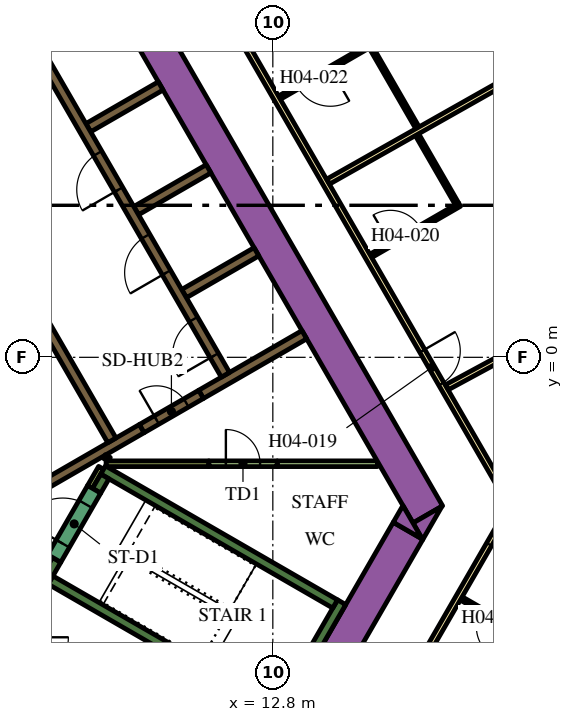
"""IFC4 building model, lengths in metres.
Left out: names, types, materials, properties, quantities, classifications, styles, units other than length and angle.
Written with IfcOpenShell. Run it as: python <this file> out.ifc"""

import sys

from ifc_helpers import new_model, si_unit, direction, frame, frame_2d, origin, place, context, subcontext, project, spatial, polyline, rectangle, outline, extrude, element, fill, save


model = new_model("IFC4")
c1 = context("Model", 3, precision=1e-05, world=origin(), true_north=direction((0.0, 1.0)))
c2 = subcontext(c1, "Body", "Model", "MODEL_VIEW")
j1 = project(units=[si_unit("LENGTHUNIT", "METRE"), si_unit("PLANEANGLEUNIT", "RADIAN")], contexts=[c1])
p1 = place(None, origin())
s1 = spatial("IfcSite", under=j1, at=p1, CompositionType="ELEMENT")
p2 = place(p1, origin())
s2 = spatial("IfcBuilding", under=s1, at=p2, CompositionType="ELEMENT")
p3 = place(p2, frame((0.0, 0.0, 62.7)))
s3 = spatial("IfcBuildingStorey", under=s2, at=p3, CompositionType="ELEMENT", Elevation=62.7)
p4 = place(p3, frame((6.776, 13.364, 0.0), z_axis=(0.0, 0.0, 1.0), x_axis=(0.500004177138, -0.8660229921, 0.0)))
e1 = element("IfcWall", 1, at=p4, inside=s3, PredefinedType="SOLIDWALL", context=c2, shape_type="SweptSolid", body=[
    extrude(rectangle(XDim=20.204, YDim=0.9, at=frame_2d((10.102, 0.0))), origin(), (0.0, 0.0, 1.0), 3.9),
])
p5 = place(p3, origin())
e2 = element("IfcWall", 2, at=p5, inside=s3, PredefinedType="SOLIDWALL", context=c2, shape_type="SweptSolid", body=[
    extrude(outline(polyline([(16.743, -4.8), (16.489, -4.36), (17.251, -3.92), (16.743, -4.8)])), origin(), (0.0, 0.0, 1.0), 3.9),
])
p6 = place(p3, frame((11.695, -12.644, 0.0), z_axis=(0.0, 0.0, 1.0), x_axis=(0.500010229568, 0.86601949766, 0.0)))
e3 = element("IfcWall", 3, at=p6, inside=s3, PredefinedType="SOLIDWALL", context=c2, shape_type="SweptSolid", body=[
    extrude(rectangle(XDim=9.326, YDim=0.9, at=frame_2d((4.663, 0.0))), origin(), (0.0, 0.0, 1.0), 3.9),
])
e4 = element("IfcWall", 4, at=p5, inside=s3, PredefinedType="SOLIDWALL", context=c2, shape_type="SweptSolid", body=[
    extrude(outline(polyline([(16.223, -3.9), (16.732, -4.78), (15.969, -4.34), (16.223, -3.9)])), origin(), (0.0, 0.0, 1.0), 3.9),
])
p7 = place(p3, frame((12.885, -9.431, 0.0), z_axis=(0.0, 0.0, 1.0), x_axis=(0.500020560727, 0.866013532718, 0.0)))
e5 = element("IfcWall", 5, at=p7, inside=s3, PredefinedType="SOLIDWALL", context=c2, shape_type="SweptSolid", body=[
    extrude(rectangle(XDim=3.45, YDim=0.25, at=frame_2d((1.725, 0.0))), origin(), (0.0, 0.0, 1.0), 3.9),
])
p8 = place(p3, frame((12.84, -9.261, 0.0), z_axis=(0.0, 0.0, 1.0), x_axis=(-0.866013990052, 0.500019768644, 0.0)))
e6 = element("IfcWall", 6, at=p8, inside=s3, PredefinedType="SOLIDWALL", context=c2, shape_type="SweptSolid", body=[
    extrude(rectangle(XDim=6.8, YDim=0.25, at=frame_2d((3.4, 0.0))), origin(), (0.0, 0.0, 1.0), 3.9),
])
p9 = place(p3, frame((7.113, -5.33, 0.0), z_axis=(0.0, 0.0, 1.0), x_axis=(-0.499965889992, -0.866045096311, 0.0)))
e7 = element("IfcWall", 7, at=p9, inside=s3, PredefinedType="SOLIDWALL", context=c2, shape_type="SweptSolid", body=[
    extrude(rectangle(XDim=0.666, YDim=0.25, at=frame_2d((0.333, 0.0))), origin(), (0.0, 0.0, 1.0), 3.9),
])
p10 = place(p3, frame((8.334, -2.964, 0.0), z_axis=(0.0, 0.0, 1.0), x_axis=(0.866016039709, -0.500016218704, 0.0)))
e8 = element("IfcWall", 8, at=p10, inside=s3, PredefinedType="SOLIDWALL", context=c2, shape_type="SweptSolid", body=[
    extrude(rectangle(XDim=7.05, YDim=0.25, at=frame_2d((3.525, 0.0))), origin(), (0.0, 0.0, 1.0), 3.9),
])
p11 = place(p3, frame((8.163, -3.511, 0.0), z_axis=(0.0, 0.0, 1.0), x_axis=(0.500127794843, 0.865951608824, 0.0)))
e9 = element("IfcWall", 9, at=p11, inside=s3, PredefinedType="SOLIDWALL", context=c2, shape_type="SweptSolid", body=[
    extrude(rectangle(XDim=0.435, YDim=0.25, at=frame_2d((0.217, 0.0))), origin(), (0.0, 0.0, 1.0), 3.9),
])
p12 = place(p3, frame((10.464, 1.677, 0.0), z_axis=(0.0, 0.0, 1.0), x_axis=(0.86605622881, 0.499946605688, 0.0)))
e10 = element("IfcWall", 10, at=p12, inside=s3, PredefinedType="SOLIDWALL", context=c2, shape_type="SweptSolid", body=[
    extrude(rectangle(XDim=2.2, YDim=0.25, at=frame_2d((1.1, 0.0))), origin(), (0.0, 0.0, 1.0), 3.9),
])
p13 = place(p3, frame((9.352, -1.875, 0.0), z_axis=(0.0, 0.0, 1.0), x_axis=(-0.866024844342, -0.500000968981, 0.0)))
e11 = element("IfcWall", 11, at=p13, inside=s3, PredefinedType="SOLIDWALL", context=c2, shape_type="SweptSolid", body=[
    extrude(rectangle(XDim=3.162, YDim=0.25, at=frame_2d((1.581, 0.0))), origin(), (0.0, 0.0, 1.0), 3.9),
])
for number, where, z_axis, x_axis in (
    (12, (7.944, 6.041, 0.0), (0.0, 0.0, 1.0), (0.866, 0.5, 0.0)),
    (13, (9.204, 3.859, 0.0), (0.0, 0.0, 1.0), (0.866, 0.5, 0.0)),
):
    element("IfcWall", number, at=place(p3, frame(where, z_axis=z_axis, x_axis=x_axis)), inside=s3, PredefinedType="SOLIDWALL", context=c2, shape_type="SweptSolid", body=[
        extrude(rectangle(XDim=2.2, YDim=0.25, at=frame_2d((1.1, 0.0))), origin(), (0.0, 0.0, 1.0), 3.9),
    ])
p14 = place(p3, frame((10.911, -0.975, 0.0), z_axis=(0.0, 0.0, 1.0), x_axis=(0.866046979468, 0.499962627957, 0.0)))
e14 = element("IfcWall", 14, at=p14, inside=s3, PredefinedType="SOLIDWALL", context=c2, shape_type="SweptSolid", body=[
    extrude(rectangle(XDim=3.138, YDim=0.25, at=frame_2d((1.569, 0.0))), origin(), (0.0, 0.0, 1.0), 3.9),
])
p15 = place(p3, frame((8.412, -2.8, 0.0), z_axis=(0.0, 0.0, 1.0), x_axis=(1.0, 0.0, 0.0)))
e15 = element("IfcWall", 15, at=p15, inside=s3, PredefinedType="PARTITIONING", context=c2, shape_type="SweptSolid", body=[
    extrude(rectangle(XDim=2.702, YDim=0.15, at=frame_2d((1.351, 0.0))), origin(), (0.0, 0.0, 1.0), 3.9),
])
p16 = place(p3, frame((8.459, -2.599, 0.0), z_axis=(0.0, 0.0, 1.0), x_axis=(-0.501919277433, -0.864914469148, 0.0)))
e16 = element("IfcWall", 16, at=p16, inside=s3, PredefinedType="PARTITIONING", context=c2, shape_type="SweptSolid", body=[
    extrude(rectangle(XDim=0.109, YDim=0.15, at=frame_2d((0.054, 0.0))), origin(), (0.0, 0.0, 1.0), 3.9),
])
p17 = place(p3, frame((8.281, -2.907, 0.0), z_axis=(0.0, 0.0, 1.0), x_axis=(-0.500193841991, -0.86591346013, 0.0)))
e17 = element("IfcWall", 17, at=p17, inside=s3, PredefinedType="PARTITIONING", context=c2, shape_type="SweptSolid", body=[
    extrude(rectangle(XDim=0.583, YDim=0.15, at=frame_2d((0.292, 0.0))), origin(), (0.0, 0.0, 1.0), 3.9),
])
p18 = place(p3, frame((12.915, -2.8, 0.0), z_axis=(0.0, 0.0, 1.0), x_axis=(1.0, 0.0, 0.0)))
e18 = element("IfcWall", 18, at=p18, inside=s3, PredefinedType="PARTITIONING", context=c2, shape_type="SweptSolid", body=[
    extrude(rectangle(XDim=2.637, YDim=0.15, at=frame_2d((1.318, 0.0))), origin(), (0.0, 0.0, 1.0), 2.75),
])
p19 = place(p3, frame((11.553, -0.46, 0.0), z_axis=(0.0, 0.0, 1.0), x_axis=(-0.500006514828, 0.866021642414, 0.0)))
e19 = element("IfcWall", 19, at=p19, inside=s3, PredefinedType="SOLIDWALL", context=c2, shape_type="SweptSolid", body=[
    extrude(rectangle(XDim=12.35, YDim=0.25, at=frame_2d((6.175, 0.0))), origin(), (0.0, 0.0, 1.0), 3.9),
])
p20 = place(p19, frame((0.585, 0.0, 0.0)))
e20 = element("IfcOpeningElement", 20, at=p20, cuts=e19, PredefinedType="OPENING", context=c2, shape_type="SweptSolid", body=[
    extrude(rectangle(XDim=1.1, YDim=2.1, at=frame_2d((0.55, 1.05))), frame((0.0, 0.135, 0.0), z_axis=(0.0, -1.0, 0.0), x_axis=(1.0, 0.0, 0.0)), (0.0, 0.0, 1.0), 0.27),
])
p21 = place(p19, frame((3.105, 0.0, 0.0)))
e21 = element("IfcOpeningElement", 21, at=p21, cuts=e19, PredefinedType="OPENING", context=c2, shape_type="SweptSolid", body=[
    extrude(rectangle(XDim=1.1, YDim=2.1, at=frame_2d((0.55, 1.05))), frame((0.0, 0.135, 0.0), z_axis=(0.0, -1.0, 0.0), x_axis=(1.0, 0.0, 0.0)), (0.0, 0.0, 1.0), 0.27),
])
p22 = place(p19, frame((5.625, 0.0, 0.0)))
e22 = element("IfcOpeningElement", 22, at=p22, cuts=e19, PredefinedType="OPENING", context=c2, shape_type="SweptSolid", body=[
    extrude(rectangle(XDim=1.1, YDim=2.1, at=frame_2d((0.55, 1.05))), frame((0.0, 0.135, 0.0), z_axis=(0.0, -1.0, 0.0), x_axis=(1.0, 0.0, 0.0)), (0.0, 0.0, 1.0), 0.27),
])
p23 = place(p3, frame((8.565, -2.185, 0.0), z_axis=(0.0, 0.0, 1.0), x_axis=(-0.499997954832, 0.866026584559, 0.0)))
e23 = element("IfcWall", 23, at=p23, inside=s3, PredefinedType="SOLIDWALL", context=c2, shape_type="SweptSolid", body=[
    extrude(rectangle(XDim=12.35, YDim=0.25, at=frame_2d((6.175, 0.0))), origin(), (0.0, 0.0, 1.0), 3.9),
])
p24 = place(p23, frame((5.725, 0.0, 0.0)))
e24 = element("IfcOpeningElement", 24, at=p24, cuts=e23, PredefinedType="OPENING", context=c2, shape_type="SweptSolid", body=[
    extrude(rectangle(XDim=0.9, YDim=2.1, at=frame_2d((0.45, 1.05))), frame((0.0, 0.135, 0.0), z_axis=(0.0, -1.0, 0.0), x_axis=(1.0, 0.0, 0.0)), (0.0, 0.0, 1.0), 0.27),
])
p25 = place(p3, frame((7.048, -5.292, 0.0), z_axis=(0.0, 0.0, 1.0), x_axis=(0.49994051562, 0.866059744384, 0.0)))
e25 = element("IfcWall", 25, at=p25, inside=s3, PredefinedType="SOLIDWALL", context=c2, shape_type="SweptSolid", body=[
    extrude(rectangle(XDim=2.1, YDim=0.4, at=frame_2d((1.05, 0.0))), origin(), (0.0, 0.0, 1.0), 3.9),
])
p26 = place(p25, frame((0.45, 0.0, 0.0)))
e26 = element("IfcOpeningElement", 26, at=p26, cuts=e25, PredefinedType="OPENING", context=c2, shape_type="SweptSolid", body=[
    extrude(rectangle(XDim=1.2, YDim=2.1, at=frame_2d((0.6, 1.05))), frame((0.0, 0.21, 0.0), z_axis=(0.0, -1.0, 0.0), x_axis=(1.0, 0.0, 0.0)), (0.0, 0.0, 1.0), 0.42),
])
p27 = place(p3, frame((9.352, -1.875, 0.0), z_axis=(0.0, 0.0, 1.0), x_axis=(0.865989075817, 0.500062916607, 0.0)))
e27 = element("IfcWall", 27, at=p27, inside=s3, PredefinedType="SOLIDWALL", context=c2, shape_type="SweptSolid", body=[
    extrude(rectangle(XDim=1.8, YDim=0.25, at=frame_2d((0.9, 0.0))), origin(), (0.0, 0.0, 1.0), 3.9),
])
p28 = place(p27, frame((0.45, 0.0, 0.0)))
e28 = element("IfcOpeningElement", 28, at=p28, cuts=e27, PredefinedType="OPENING", context=c2, shape_type="SweptSolid", body=[
    extrude(rectangle(XDim=0.9, YDim=2.1, at=frame_2d((0.45, 1.05))), frame((0.0, 0.135, 0.0), z_axis=(0.0, -1.0, 0.0), x_axis=(1.0, 0.0, 0.0)), (0.0, 0.0, 1.0), 0.27),
])
p29 = place(p3, frame((11.115, -2.8, 0.0), z_axis=(0.0, 0.0, 1.0), x_axis=(1.0, 0.0, 0.0)))
e29 = element("IfcWall", 29, at=p29, inside=s3, PredefinedType="PARTITIONING", context=c2, shape_type="SweptSolid", body=[
    extrude(rectangle(XDim=1.8, YDim=0.15, at=frame_2d((0.9, 0.0))), origin(), (0.0, 0.0, 1.0), 2.75),
])
p30 = place(p29, frame((0.45, 0.0, 0.0)))
e30 = element("IfcOpeningElement", 30, at=p30, cuts=e29, PredefinedType="OPENING", context=c2, shape_type="SweptSolid", body=[
    extrude(rectangle(XDim=0.9, YDim=2.1, at=frame_2d((0.45, 1.05))), frame((0.0, 0.085, 0.0), z_axis=(0.0, -1.0, 0.0), x_axis=(1.0, 0.0, 0.0)), (0.0, 0.0, 1.0), 0.17),
])
p31 = place(p3, frame((19.081, -3.9, 0.0), z_axis=(0.0, 0.0, 1.0), x_axis=(-0.499974327079, -0.866040225545, 0.0)))
e31 = element("IfcWall", 31, at=p31, inside=s3, PredefinedType="PARTITIONING", context=c2, shape_type="SweptSolid", body=[
    extrude(rectangle(XDim=5.258, YDim=0.15, at=frame_2d((2.629, 0.0))), origin(), (0.0, 0.0, 1.0), 2.75),
])
p32 = place(p31, frame((0.18, 0.0, 0.0)))
e32 = element("IfcOpeningElement", 32, at=p32, cuts=e31, PredefinedType="OPENING", context=c2, shape_type="SweptSolid", body=[
    extrude(rectangle(XDim=1.0, YDim=2.1, at=frame_2d((0.5, 1.05))), frame((0.0, 0.085, 0.0), z_axis=(0.0, -1.0, 0.0), x_axis=(1.0, 0.0, 0.0)), (0.0, 0.0, 1.0), 0.17),
])
p33 = place(p3, frame((6.163, 18.475, 0.0), z_axis=(0.0, 0.0, 1.0), x_axis=(0.500001317485, -0.866024643133, 0.0)))
e33 = element("IfcWall", 33, at=p33, inside=s3, PredefinedType="PARTITIONING", context=c2, shape_type="SweptSolid", body=[
    extrude(rectangle(XDim=25.767, YDim=0.15, at=frame_2d((12.883, 0.0))), origin(), (0.0, 0.0, 1.0), 2.75),
])
p34 = place(p33, frame((21.138, 0.0, 0.0)))
e34 = element("IfcOpeningElement", 34, at=p34, cuts=e33, PredefinedType="OPENING", context=c2, shape_type="SweptSolid", body=[
    extrude(rectangle(XDim=1.0, YDim=2.1, at=frame_2d((0.5, 1.05))), frame((0.0, 0.085, 0.0), z_axis=(0.0, -1.0, 0.0), x_axis=(1.0, 0.0, 0.0)), (0.0, 0.0, 1.0), 0.17),
])
p35 = place(p33, frame((9.948, 0.0, 0.0)))
e35 = element("IfcOpeningElement", 35, at=p35, cuts=e33, PredefinedType="OPENING", context=c2, shape_type="SweptSolid", body=[
    extrude(rectangle(XDim=1.1, YDim=2.1, at=frame_2d((0.55, 1.05))), frame((0.0, 0.085, 0.0), z_axis=(0.0, -1.0, 0.0), x_axis=(1.0, 0.0, 0.0)), (0.0, 0.0, 1.0), 0.17),
])
p36 = place(p33, frame((8.641, 0.0, 0.0)))
e36 = element("IfcOpeningElement", 36, at=p36, cuts=e33, PredefinedType="OPENING", context=c2, shape_type="SweptSolid", body=[
    extrude(rectangle(XDim=1.0, YDim=2.1, at=frame_2d((0.5, 1.05))), frame((0.0, 0.085, 0.0), z_axis=(0.0, -1.0, 0.0), x_axis=(1.0, 0.0, 0.0)), (0.0, 0.0, 1.0), 0.17),
])
p37 = place(p33, frame((0.18, 0.0, 0.0)))
e37 = element("IfcOpeningElement", 37, at=p37, cuts=e33, PredefinedType="OPENING", context=c2, shape_type="SweptSolid", body=[
    extrude(rectangle(XDim=1.0, YDim=2.1, at=frame_2d((0.5, 1.05))), frame((0.0, 0.085, 0.0), z_axis=(0.0, -1.0, 0.0), x_axis=(1.0, 0.0, 0.0)), (0.0, 0.0, 1.0), 0.17),
])
p38 = place(p3, frame((21.052, 8.464, 0.0), z_axis=(0.0, 0.0, 1.0), x_axis=(-0.87059371954, -0.492002617368, 0.0)))
e38 = element("IfcWall", 38, at=p38, inside=s3, PredefinedType="PARTITIONING", context=c2, shape_type="SweptSolid", body=[
    extrude(rectangle(XDim=7.803, YDim=0.15, at=frame_2d((3.902, 0.0))), origin(), (0.0, 0.0, 1.0), 2.75),
])
p39 = place(p3, frame((24.145, 2.871, 0.0), z_axis=(0.0, 0.0, 1.0), x_axis=(-0.879551725039, -0.475803281809, 0.0)))
e39 = element("IfcWall", 39, at=p39, inside=s3, PredefinedType="PARTITIONING", context=c2, shape_type="SweptSolid", body=[
    extrude(rectangle(XDim=7.688, YDim=0.15, at=frame_2d((3.844, 0.0))), origin(), (0.0, 0.0, 1.0), 2.75),
])
p40 = place(p3, frame((20.182, -7.743, 0.0), z_axis=(0.0, 0.0, 1.0), x_axis=(-0.866034573852, 0.49998411664, 0.0)))
e40 = element("IfcWall", 40, at=p40, inside=s3, PredefinedType="PARTITIONING", context=c2, shape_type="SweptSolid", body=[
    extrude(rectangle(XDim=2.8, YDim=0.1, at=frame_2d((1.4, 0.0))), origin(), (0.0, 0.0, 1.0), 2.75),
])
p41 = place(p40, frame((1.3, 0.0, 0.0)))
e41 = element("IfcOpeningElement", 41, at=p41, cuts=e40, PredefinedType="OPENING", context=c2, shape_type="SweptSolid", body=[
    extrude(rectangle(XDim=0.9, YDim=2.1, at=frame_2d((0.45, 1.05))), frame((0.0, 0.06, 0.0), z_axis=(0.0, -1.0, 0.0), x_axis=(1.0, 0.0, 0.0)), (0.0, 0.0, 1.0), 0.12),
])
p42 = place(p3, frame((15.376, 2.668, 0.0), z_axis=(0.0, 0.0, 1.0), x_axis=(0.866036505625, 0.499980770555, 0.0)))
e42 = element("IfcWall", 42, at=p42, inside=s3, PredefinedType="PARTITIONING", context=c2, shape_type="SweptSolid", body=[
    extrude(rectangle(XDim=2.7, YDim=0.1, at=frame_2d((1.35, 0.0))), origin(), (0.0, 0.0, 1.0), 2.75),
])
p43 = place(p42, frame((0.6, 0.0, 0.0)))
e43 = element("IfcOpeningElement", 43, at=p43, cuts=e42, PredefinedType="OPENING", context=c2, shape_type="SweptSolid", body=[
    extrude(rectangle(XDim=0.9, YDim=2.1, at=frame_2d((0.45, 1.05))), frame((0.0, 0.06, 0.0), z_axis=(0.0, -1.0, 0.0), x_axis=(1.0, 0.0, 0.0)), (0.0, 0.0, 1.0), 0.12),
])
p44 = place(p3, frame((17.646, 4.036, 0.0), z_axis=(0.0, 0.0, 1.0), x_axis=(-0.500027713859, 0.866009402589, 0.0)))
e44 = element("IfcWall", 44, at=p44, inside=s3, PredefinedType="PARTITIONING", context=c2, shape_type="SweptSolid", body=[
    extrude(rectangle(XDim=2.1, YDim=0.1, at=frame_2d((1.05, 0.0))), origin(), (0.0, 0.0, 1.0), 2.75),
])
p45 = place(p3, frame((15.397, 8.231, 0.0), z_axis=(0.0, 0.0, 1.0), x_axis=(-0.866018616679, -0.500011755427, 0.0)))
e45 = element("IfcWall", 45, at=p45, inside=s3, PredefinedType="PARTITIONING", context=c2, shape_type="SweptSolid", body=[
    extrude(rectangle(XDim=2.8, YDim=0.1, at=frame_2d((1.4, 0.0))), origin(), (0.0, 0.0, 1.0), 2.75),
])
p46 = place(p45, frame((1.25, 0.0, 0.0)))
e46 = element("IfcOpeningElement", 46, at=p46, cuts=e45, PredefinedType="OPENING", context=c2, shape_type="SweptSolid", body=[
    extrude(rectangle(XDim=1.0, YDim=2.1, at=frame_2d((0.5, 1.05))), frame((0.0, 0.06, 0.0), z_axis=(0.0, -1.0, 0.0), x_axis=(1.0, 0.0, 0.0)), (0.0, 0.0, 1.0), 0.12),
])
p47 = place(p3, frame((15.379, 8.163, 0.0), z_axis=(0.0, 0.0, 1.0), x_axis=(0.499987006516, -0.866032905446, 0.0)))
e47 = element("IfcWall", 47, at=p47, inside=s3, PredefinedType="PARTITIONING", context=c2, shape_type="SweptSolid", body=[
    extrude(rectangle(XDim=2.45, YDim=0.1, at=frame_2d((1.225, 0.0))), origin(), (0.0, 0.0, 1.0), 2.75),
])
p48 = place(p20, origin())
e48 = element("IfcDoor", 48, at=p48, inside=s3, OperationType="DOUBLE_DOOR_SLIDING", PredefinedType="DOOR", context=c2, shape_type="SweptSolid", body=[
    extrude(rectangle(XDim=1.1, YDim=2.1, at=frame_2d((0.55, 1.05))), frame((0.0, 0.025, 0.0), z_axis=(0.0, -1.0, 0.0), x_axis=(1.0, 0.0, 0.0)), (0.0, 0.0, 1.0), 0.05),
])
fill(e20, e48)
p49 = place(p21, origin())
e49 = element("IfcDoor", 49, at=p49, inside=s3, OperationType="DOUBLE_DOOR_SLIDING", PredefinedType="DOOR", context=c2, shape_type="SweptSolid", body=[
    extrude(rectangle(XDim=1.1, YDim=2.1, at=frame_2d((0.55, 1.05))), frame((0.0, 0.025, 0.0), z_axis=(0.0, -1.0, 0.0), x_axis=(1.0, 0.0, 0.0)), (0.0, 0.0, 1.0), 0.05),
])
fill(e21, e49)
p50 = place(p22, origin())
e50 = element("IfcDoor", 50, at=p50, inside=s3, OperationType="DOUBLE_DOOR_SLIDING", PredefinedType="DOOR", context=c2, shape_type="SweptSolid", body=[
    extrude(rectangle(XDim=1.1, YDim=2.1, at=frame_2d((0.55, 1.05))), frame((0.0, 0.025, 0.0), z_axis=(0.0, -1.0, 0.0), x_axis=(1.0, 0.0, 0.0)), (0.0, 0.0, 1.0), 0.05),
])
fill(e22, e50)
p51 = place(p26, origin())
e51 = element("IfcDoor", 51, at=p51, inside=s3, OperationType="SINGLE_SWING_LEFT", PredefinedType="DOOR", context=c2, shape_type="SweptSolid", body=[
    extrude(rectangle(XDim=1.2, YDim=2.1, at=frame_2d((0.6, 1.05))), frame((0.0, 0.025, 0.0), z_axis=(0.0, -1.0, 0.0), x_axis=(1.0, 0.0, 0.0)), (0.0, 0.0, 1.0), 0.05),
])
fill(e26, e51)
p52 = place(p28, origin())
e52 = element("IfcDoor", 52, at=p52, inside=s3, OperationType="SINGLE_SWING_LEFT", PredefinedType="DOOR", context=c2, shape_type="SweptSolid", body=[
    extrude(rectangle(XDim=0.9, YDim=2.1, at=frame_2d((0.45, 1.05))), frame((0.0, 0.025, 0.0), z_axis=(0.0, -1.0, 0.0), x_axis=(1.0, 0.0, 0.0)), (0.0, 0.0, 1.0), 0.05),
])
fill(e28, e52)
p53 = place(p30, origin())
e53 = element("IfcDoor", 53, at=p53, inside=s3, OperationType="SINGLE_SWING_LEFT", PredefinedType="DOOR", context=c2, shape_type="SweptSolid", body=[
    extrude(rectangle(XDim=0.9, YDim=2.1, at=frame_2d((0.45, 1.05))), frame((0.0, 0.025, 0.0), z_axis=(0.0, -1.0, 0.0), x_axis=(1.0, 0.0, 0.0)), (0.0, 0.0, 1.0), 0.05),
])
fill(e30, e53)
p54 = place(p32, origin())
e54 = element("IfcDoor", 54, at=p54, inside=s3, OperationType="SINGLE_SWING_LEFT", PredefinedType="DOOR", context=c2, shape_type="SweptSolid", body=[
    extrude(rectangle(XDim=1.0, YDim=2.1, at=frame_2d((0.5, 1.05))), frame((0.0, 0.025, 0.0), z_axis=(0.0, -1.0, 0.0), x_axis=(1.0, 0.0, 0.0)), (0.0, 0.0, 1.0), 0.05),
])
fill(e32, e54)
p55 = place(p41, origin())
e55 = element("IfcDoor", 55, at=p55, inside=s3, OperationType="SINGLE_SWING_RIGHT", PredefinedType="DOOR", context=c2, shape_type="SweptSolid", body=[
    extrude(rectangle(XDim=0.9, YDim=2.1, at=frame_2d((0.45, 1.05))), frame((0.0, 0.025, 0.0), z_axis=(0.0, -1.0, 0.0), x_axis=(1.0, 0.0, 0.0)), (0.0, 0.0, 1.0), 0.05),
])
fill(e41, e55)
p56 = place(p34, origin())
e56 = element("IfcDoor", 56, at=p56, inside=s3, OperationType="SINGLE_SWING_RIGHT", PredefinedType="DOOR", context=c2, shape_type="SweptSolid", body=[
    extrude(rectangle(XDim=1.0, YDim=2.1, at=frame_2d((0.5, 1.05))), frame((0.0, 0.025, 0.0), z_axis=(0.0, -1.0, 0.0), x_axis=(1.0, 0.0, 0.0)), (0.0, 0.0, 1.0), 0.05),
])
fill(e34, e56)
p57 = place(p43, origin())
e57 = element("IfcDoor", 57, at=p57, inside=s3, OperationType="SINGLE_SWING_LEFT", PredefinedType="DOOR", context=c2, shape_type="SweptSolid", body=[
    extrude(rectangle(XDim=0.9, YDim=2.1, at=frame_2d((0.45, 1.05))), frame((0.0, 0.025, 0.0), z_axis=(0.0, -1.0, 0.0), x_axis=(1.0, 0.0, 0.0)), (0.0, 0.0, 1.0), 0.05),
])
fill(e43, e57)
p58 = place(p46, origin())
e58 = element("IfcDoor", 58, at=p58, inside=s3, OperationType="SINGLE_SWING_LEFT", PredefinedType="DOOR", context=c2, shape_type="SweptSolid", body=[
    extrude(rectangle(XDim=1.0, YDim=2.1, at=frame_2d((0.5, 1.05))), frame((0.0, 0.025, 0.0), z_axis=(0.0, -1.0, 0.0), x_axis=(1.0, 0.0, 0.0)), (0.0, 0.0, 1.0), 0.05),
])
fill(e46, e58)
save(model, sys.argv[1])
